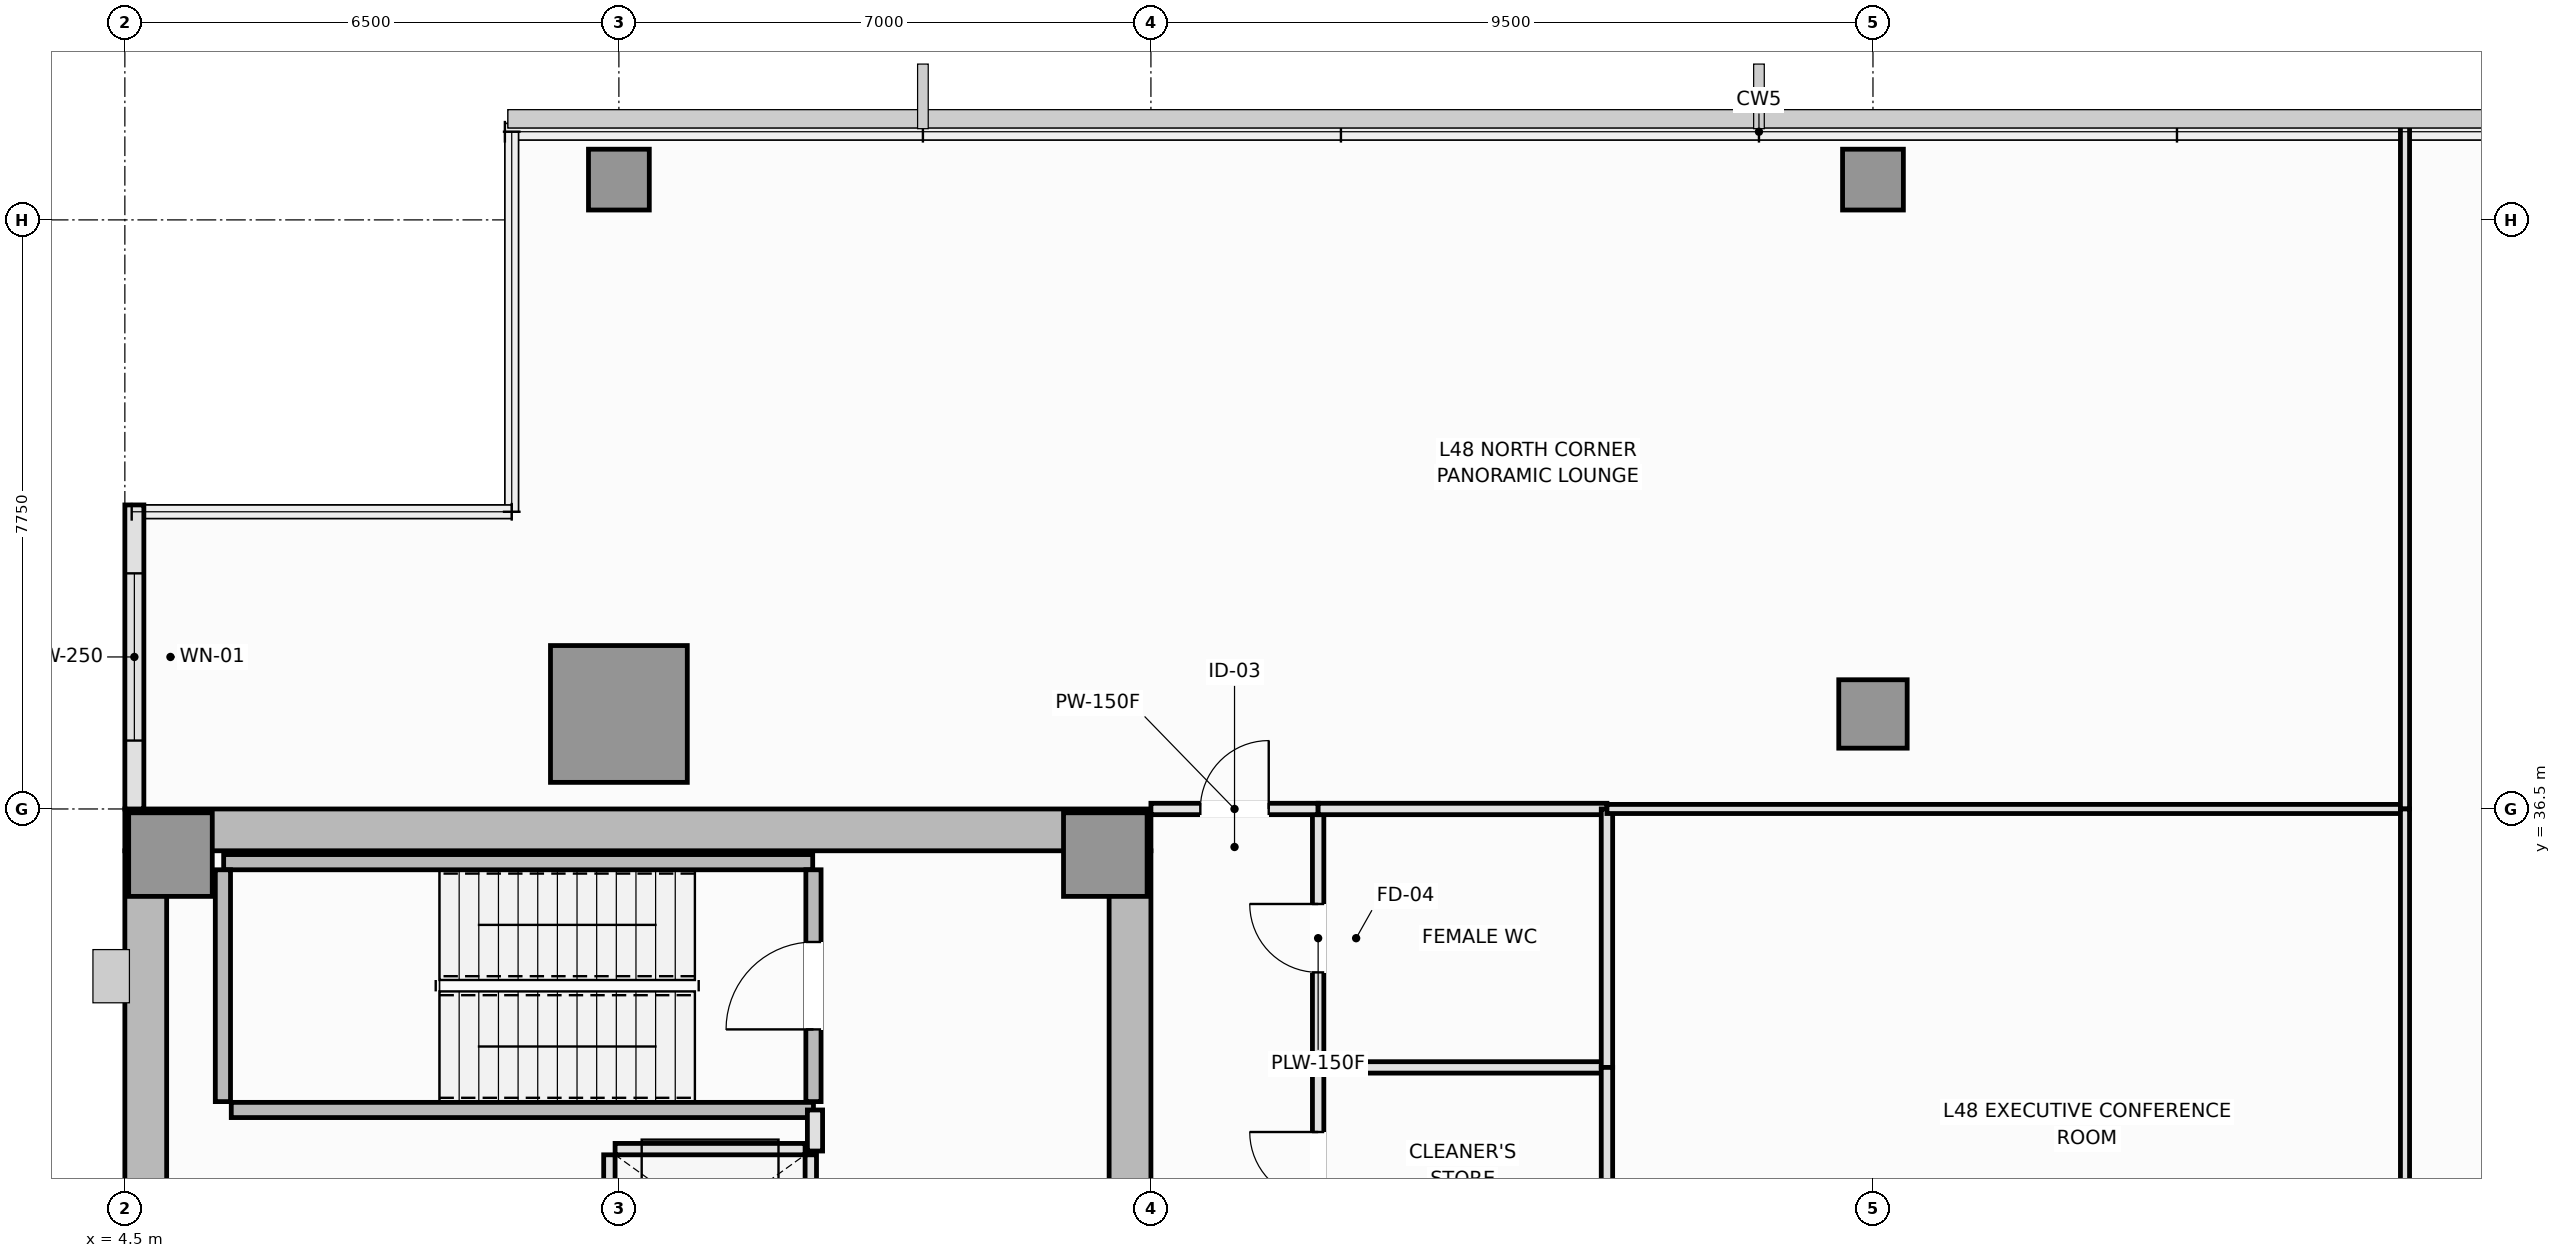
"""IFC4 building model, lengths in metres.
Left out: names, types, materials, properties, quantities, classifications, styles, units other than length and angle.
Written with IfcOpenShell. Run it as: python <this file> out.ifc"""

import sys

from ifc_helpers import new_model, si_unit, direction, frame, frame_2d, origin, origin_2d, place, context, subcontext, project, spatial, rectangle, extrude, element, fill, save


model = new_model("IFC4")
c1 = context("Model", 3, precision=1e-05, world=origin(), true_north=direction((0.0, 1.0)))
c2 = subcontext(c1, "Body", "Model", "MODEL_VIEW")
j1 = project(units=[si_unit("LENGTHUNIT", "METRE"), si_unit("PLANEANGLEUNIT", "RADIAN")], contexts=[c1])
p1 = place(None, origin())
s1 = spatial("IfcSite", under=j1, at=p1, CompositionType="ELEMENT")
p2 = place(p1, origin())
s2 = spatial("IfcBuilding", under=s1, at=p2, CompositionType="ELEMENT")
p3 = place(p2, frame((0.0, 0.0, 183.65)))
s3 = spatial("IfcBuildingStorey", under=s2, at=p3, CompositionType="ELEMENT", Elevation=183.65)
p4 = place(p3, frame((4.5, 36.225, 0.0), z_axis=(0.0, 0.0, 1.0), x_axis=(1.0, 0.0, 0.0)))
e1 = element("IfcWall", 1, at=p4, inside=s3, PredefinedType="SHEAR", context=c2, shape_type="SweptSolid", body=[
    extrude(rectangle(XDim=13.5, YDim=0.55, at=frame_2d((6.75, 0.0))), origin(), (0.0, 0.0, 1.0), 4.4),
])
p5 = place(p3, frame((4.775, 14.55, 0.0), z_axis=(0.0, 0.0, 1.0), x_axis=(0.0, 1.0, 0.0)))
e2 = element("IfcWall", 2, at=p5, inside=s3, PredefinedType="SHEAR", context=c2, shape_type="SweptSolid", body=[
    extrude(rectangle(XDim=21.4, YDim=0.55, at=frame_2d((10.7, 0.0))), origin(), (0.0, 0.0, 1.0), 4.4),
])
p6 = place(p3, frame((17.725, 27.05, 0.0), z_axis=(0.0, 0.0, 1.0), x_axis=(0.0, 1.0, 0.0)))
e3 = element("IfcWall", 3, at=p6, inside=s3, PredefinedType="SHEAR", context=c2, shape_type="SweptSolid", body=[
    extrude(rectangle(XDim=8.9, YDim=0.55, at=frame_2d((4.45, 0.0))), origin(), (0.0, 0.0, 1.0), 4.4),
])
p7 = place(p6, frame((3.45, 0.0, 0.0)))
e4 = element("IfcOpeningElement", 4, at=p7, cuts=e3, PredefinedType="OPENING", context=c2, shape_type="SweptSolid", body=[
    extrude(rectangle(XDim=1.1, YDim=2.15, at=frame_2d((0.55, 1.075))), frame((0.0, 0.285, 0.0), z_axis=(0.0, -1.0, 0.0), x_axis=(1.0, 0.0, 0.0)), (0.0, 0.0, 1.0), 0.57),
])
for number, where, z_axis, x_axis in (
    (5, (5.1, 35.9, 0.0), (0.0, 0.0, 1.0), (1.0, 0.0, 0.0)),
    (6, (17.4, 35.9, 0.0), (0.0, 0.0, 1.0), (1.0, 0.0, 0.0)),
):
    element("IfcColumn", number, at=place(p3, frame(where, z_axis=z_axis, x_axis=x_axis)), inside=s3, PredefinedType="PILASTER", context=c2, shape_type="SweptSolid", body=[
        extrude(rectangle(XDim=1.1, YDim=1.1, at=origin_2d()), origin(), (0.0, 0.0, 1.0), 4.4),
    ])
p8 = place(p3, frame((11.0, 37.75, 0.0), z_axis=(0.0, 0.0, 1.0), x_axis=(1.0, 0.0, 0.0)))
e7 = element("IfcColumn", 7, at=p8, inside=s3, PredefinedType="COLUMN", context=c2, shape_type="SweptSolid", body=[
    extrude(rectangle(XDim=1.8, YDim=1.8, at=origin_2d()), origin(), (0.0, 0.0, 1.0), 4.4),
])
p9 = place(p3, frame((27.5, 37.75, 0.0), z_axis=(0.0, 0.0, 1.0), x_axis=(1.0, 0.0, 0.0)))
e8 = element("IfcColumn", 8, at=p9, inside=s3, PredefinedType="COLUMN", context=c2, shape_type="SweptSolid", body=[
    extrude(rectangle(XDim=0.9, YDim=0.9, at=origin_2d()), origin(), (0.0, 0.0, 1.0), 4.4),
])
for number, where, z_axis, x_axis in (
    (9, (11.0, 44.78, 0.0), (0.0, 0.0, 1.0), (1.0, 0.0, 0.0)),
    (10, (27.5, 44.78, 0.0), (0.0, 0.0, 1.0), (1.0, 0.0, 0.0)),
):
    element("IfcColumn", number, at=place(p3, frame(where, z_axis=z_axis, x_axis=x_axis)), inside=s3, PredefinedType="COLUMN", context=c2, shape_type="SweptSolid", body=[
        extrude(rectangle(XDim=0.8, YDim=0.8, at=origin_2d()), origin(), (0.0, 0.0, 1.0), 4.4),
    ])
p10 = place(p3, frame((4.625, 40.5, 0.0), z_axis=(0.0, 0.0, 1.0), x_axis=(0.0, -1.0, 0.0)))
e11 = element("IfcWall", 11, at=p10, inside=s3, PredefinedType="SOLIDWALL", context=c2, shape_type="SweptSolid", body=[
    extrude(rectangle(XDim=4.0, YDim=0.25, at=frame_2d((2.0, 0.0))), origin(), (0.0, 0.0, 1.0), 4.22),
])
p11 = place(p10, frame((0.9, 0.0, 0.9)))
e12 = element("IfcOpeningElement", 12, at=p11, cuts=e11, PredefinedType="OPENING", context=c2, shape_type="SweptSolid", body=[
    extrude(rectangle(XDim=2.2, YDim=1.8, at=frame_2d((1.1, 0.9))), frame((0.0, 0.135, 0.0), z_axis=(0.0, -1.0, 0.0), x_axis=(1.0, 0.0, 0.0)), (0.0, 0.0, 1.0), 0.27),
])
p12 = place(p3, frame((5.8, 35.8, 0.0), z_axis=(0.0, 0.0, 1.0), x_axis=(1.0, 0.0, 0.0)))
e13 = element("IfcWall", 13, at=p12, inside=s3, PredefinedType="SOLIDWALL", context=c2, shape_type="SweptSolid", body=[
    extrude(rectangle(XDim=7.75, YDim=0.2, at=frame_2d((3.875, 0.0))), origin(), (0.0, 0.0, 1.0), 4.4),
])
p13 = place(p3, frame((5.79, 32.65, 0.0), z_axis=(0.0, 0.0, 1.0), x_axis=(0.0, 1.0, 0.0)))
e14 = element("IfcWall", 14, at=p13, inside=s3, PredefinedType="SOLIDWALL", context=c2, shape_type="SweptSolid", body=[
    extrude(rectangle(XDim=3.05, YDim=0.2, at=frame_2d((1.525, 0.0))), origin(), (0.0, 0.0, 1.0), 4.4),
])
p14 = place(p3, frame((5.9, 32.54, 0.0), z_axis=(0.0, 0.0, 1.0), x_axis=(1.0, 0.0, 0.0)))
e15 = element("IfcWall", 15, at=p14, inside=s3, PredefinedType="SOLIDWALL", context=c2, shape_type="SweptSolid", body=[
    extrude(rectangle(XDim=7.66, YDim=0.2, at=frame_2d((3.83, 0.0))), origin(), (0.0, 0.0, 1.0), 4.4),
])
p15 = place(p3, frame((13.56, 32.65, 0.0), z_axis=(0.0, 0.0, 1.0), x_axis=(0.0, 1.0, 0.0)))
e16 = element("IfcWall", 16, at=p15, inside=s3, PredefinedType="SOLIDWALL", context=c2, shape_type="SweptSolid", body=[
    extrude(rectangle(XDim=3.05, YDim=0.2, at=frame_2d((1.525, 0.0))), origin(), (0.0, 0.0, 1.0), 4.4),
])
p16 = place(p15, frame((0.95, 0.0, 0.0)))
e17 = element("IfcOpeningElement", 17, at=p16, cuts=e16, PredefinedType="OPENING", context=c2, shape_type="SweptSolid", body=[
    extrude(rectangle(XDim=1.15, YDim=2.15, at=frame_2d((0.575, 1.075))), frame((0.0, 0.11, 0.0), z_axis=(0.0, -1.0, 0.0), x_axis=(1.0, 0.0, 0.0)), (0.0, 0.0, 1.0), 0.22),
])
p17 = place(p3, frame((10.95, 32.025, 0.0), z_axis=(0.0, 0.0, 1.0), x_axis=(1.0, 0.0, 0.0)))
e18 = element("IfcWall", 18, at=p17, inside=s3, PredefinedType="PARTITIONING", context=c2, shape_type="SweptSolid", body=[
    extrude(rectangle(XDim=2.5, YDim=0.15, at=frame_2d((1.25, 0.0))), origin(), (0.0, 0.0, 1.0), 4.22),
])
p18 = place(p3, frame((10.875, 30.15, 0.0), z_axis=(0.0, 0.0, 1.0), x_axis=(0.0, 1.0, 0.0)))
e19 = element("IfcWall", 19, at=p18, inside=s3, PredefinedType="PARTITIONING", context=c2, shape_type="SweptSolid", body=[
    extrude(rectangle(XDim=1.8, YDim=0.15, at=frame_2d((0.9, 0.0))), origin(), (0.0, 0.0, 1.0), 4.22),
])
p19 = place(p3, frame((13.525, 30.15, 0.0), z_axis=(0.0, 0.0, 1.0), x_axis=(0.0, 1.0, 0.0)))
e20 = element("IfcWall", 20, at=p19, inside=s3, PredefinedType="PARTITIONING", context=c2, shape_type="SweptSolid", body=[
    extrude(rectangle(XDim=1.8, YDim=0.15, at=frame_2d((0.9, 0.0))), origin(), (0.0, 0.0, 1.0), 4.22),
])
p20 = place(p19, frame((0.35, 0.0, 0.0)))
e21 = element("IfcOpeningElement", 21, at=p20, cuts=e20, PredefinedType="OPENING", context=c2, shape_type="SweptSolid", body=[
    extrude(rectangle(XDim=1.1, YDim=2.2, at=frame_2d((0.55, 1.1))), frame((0.0, 0.085, 0.0), z_axis=(0.0, -1.0, 0.0), x_axis=(1.0, 0.0, 0.0)), (0.0, 0.0, 1.0), 0.17),
])
p21 = place(p3, frame((13.58, 32.0, 0.0), z_axis=(0.0, 0.0, 1.0), x_axis=(0.0, 1.0, 0.0)))
e22 = element("IfcWall", 22, at=p21, inside=s3, PredefinedType="PARTITIONING", context=c2, shape_type="SweptSolid", body=[
    extrude(rectangle(XDim=0.54, YDim=0.2, at=frame_2d((0.27, 0.0))), origin(), (0.0, 0.0, 1.0), 4.22),
])
p22 = place(p3, frame((20.2, 33.1, 0.0), z_axis=(0.0, 0.0, 1.0), x_axis=(0.0, 1.0, 0.0)))
e23 = element("IfcWall", 23, at=p22, inside=s3, PredefinedType="PLUMBINGWALL", context=c2, shape_type="SweptSolid", body=[
    extrude(rectangle(XDim=3.4, YDim=0.15, at=frame_2d((1.7, 0.0))), origin(), (0.0, 0.0, 1.0), 4.22),
])
p23 = place(p22, frame((1.25, 0.0, 0.0)))
e24 = element("IfcOpeningElement", 24, at=p23, cuts=e23, PredefinedType="OPENING", context=c2, shape_type="SweptSolid", body=[
    extrude(rectangle(XDim=0.9, YDim=2.1, at=frame_2d((0.45, 1.05))), frame((0.0, 0.085, 0.0), z_axis=(0.0, -1.0, 0.0), x_axis=(1.0, 0.0, 0.0)), (0.0, 0.0, 1.0), 0.17),
])
p24 = place(p3, frame((20.2, 30.5, 0.0), z_axis=(0.0, 0.0, 1.0), x_axis=(0.0, 1.0, 0.0)))
e25 = element("IfcWall", 25, at=p24, inside=s3, PredefinedType="PLUMBINGWALL", context=c2, shape_type="SweptSolid", body=[
    extrude(rectangle(XDim=2.6, YDim=0.15, at=frame_2d((1.3, 0.0))), origin(), (0.0, 0.0, 1.0), 4.22),
])
p25 = place(p24, frame((0.85, 0.0, 0.0)))
e26 = element("IfcOpeningElement", 26, at=p25, cuts=e25, PredefinedType="OPENING", context=c2, shape_type="SweptSolid", body=[
    extrude(rectangle(XDim=0.9, YDim=2.1, at=frame_2d((0.45, 1.05))), frame((0.0, 0.085, 0.0), z_axis=(0.0, -1.0, 0.0), x_axis=(1.0, 0.0, 0.0)), (0.0, 0.0, 1.0), 0.17),
])
p26 = place(p3, frame((18.0, 36.5, 0.0), z_axis=(0.0, 0.0, 1.0), x_axis=(1.0, 0.0, 0.0)))
e27 = element("IfcWall", 27, at=p26, inside=s3, PredefinedType="PARTITIONING", context=c2, shape_type="SweptSolid", body=[
    extrude(rectangle(XDim=2.2, YDim=0.15, at=frame_2d((1.1, 0.0))), origin(), (0.0, 0.0, 1.0), 4.22),
])
p27 = place(p26, frame((0.65, 0.0, 0.0)))
e28 = element("IfcOpeningElement", 28, at=p27, cuts=e27, PredefinedType="OPENING", context=c2, shape_type="SweptSolid", body=[
    extrude(rectangle(XDim=0.9, YDim=2.1, at=frame_2d((0.45, 1.05))), frame((0.0, 0.085, 0.0), z_axis=(0.0, -1.0, 0.0), x_axis=(1.0, 0.0, 0.0)), (0.0, 0.0, 1.0), 0.17),
])
for number, where, z_axis, x_axis in (
    (29, (20.2, 33.1, 0.0), (0.0, 0.0, 1.0), (1.0, 0.0, 0.0)),
    (30, (20.2, 36.5, 0.0), (0.0, 0.0, 1.0), (1.0, 0.0, 0.0)),
):
    element("IfcWall", number, at=place(p3, frame(where, z_axis=z_axis, x_axis=x_axis)), inside=s3, PredefinedType="PLUMBINGWALL", context=c2, shape_type="SweptSolid", body=[
        extrude(rectangle(XDim=3.8, YDim=0.15, at=frame_2d((1.9, 0.0))), origin(), (0.0, 0.0, 1.0), 4.22),
    ])
p28 = place(p3, frame((24.0, 33.1, 0.0), z_axis=(0.0, 0.0, 1.0), x_axis=(0.0, 1.0, 0.0)))
e31 = element("IfcWall", 31, at=p28, inside=s3, PredefinedType="PLUMBINGWALL", context=c2, shape_type="SweptSolid", body=[
    extrude(rectangle(XDim=3.4, YDim=0.15, at=frame_2d((1.7, 0.0))), origin(), (0.0, 0.0, 1.0), 4.22),
])
p29 = place(p3, frame((24.0, 30.5, 0.0), z_axis=(0.0, 0.0, 1.0), x_axis=(0.0, 1.0, 0.0)))
e32 = element("IfcWall", 32, at=p29, inside=s3, PredefinedType="PLUMBINGWALL", context=c2, shape_type="SweptSolid", body=[
    extrude(rectangle(XDim=2.6, YDim=0.15, at=frame_2d((1.3, 0.0))), origin(), (0.0, 0.0, 1.0), 4.22),
])
p30 = place(p3, frame((24.0, 36.5, 0.0), z_axis=(0.0, 0.0, 1.0), x_axis=(1.0, 0.0, 0.0)))
e33 = element("IfcWall", 33, at=p30, inside=s3, PredefinedType="PARTITIONING", context=c2, shape_type="SweptSolid", body=[
    extrude(rectangle(XDim=10.5, YDim=0.12, at=frame_2d((5.25, 0.0))), origin(), (0.0, 0.0, 1.0), 4.22),
])
p31 = place(p3, frame((34.5, 36.5, 0.0), z_axis=(0.0, 0.0, 1.0), x_axis=(0.0, 1.0, 0.0)))
e34 = element("IfcWall", 34, at=p31, inside=s3, PredefinedType="PARTITIONING", context=c2, shape_type="SweptSolid", body=[
    extrude(rectangle(XDim=8.99, YDim=0.12, at=frame_2d((4.495, 0.0))), origin(), (0.0, 0.0, 1.0), 3.86),
])
p32 = place(p3, frame((34.5, 26.7, 0.0), z_axis=(0.0, 0.0, 1.0), x_axis=(0.0, 1.0, 0.0)))
e35 = element("IfcWall", 35, at=p32, inside=s3, PredefinedType="PARTITIONING", context=c2, shape_type="SweptSolid", body=[
    extrude(rectangle(XDim=9.8, YDim=0.12, at=frame_2d((4.9, 0.0))), origin(), (0.0, 0.0, 1.0), 4.22),
])
p33 = place(p11, origin())
e36 = element("IfcWindow", 36, at=p33, inside=s3, PartitioningType="SINGLE_PANEL", PredefinedType="WINDOW", context=c2, shape_type="SweptSolid", body=[
    extrude(rectangle(XDim=2.2, YDim=1.8, at=frame_2d((1.1, 0.9))), frame((0.0, 0.03, 0.0), z_axis=(0.0, -1.0, 0.0), x_axis=(1.0, 0.0, 0.0)), (0.0, 0.0, 1.0), 0.06),
])
fill(e12, e36)
p34 = place(p16, origin())
e37 = element("IfcDoor", 37, at=p34, inside=s3, OperationType="SINGLE_SWING_LEFT", PredefinedType="DOOR", context=c2, shape_type="SweptSolid", body=[
    extrude(rectangle(XDim=1.15, YDim=2.15, at=frame_2d((0.575, 1.075))), frame((0.0, 0.025, 0.0), z_axis=(0.0, -1.0, 0.0), x_axis=(1.0, 0.0, 0.0)), (0.0, 0.0, 1.0), 0.05),
])
fill(e17, e37)
p35 = place(p23, origin())
e38 = element("IfcDoor", 38, at=p35, inside=s3, OperationType="SINGLE_SWING_RIGHT", PredefinedType="DOOR", context=c2, shape_type="SweptSolid", body=[
    extrude(rectangle(XDim=0.9, YDim=2.1, at=frame_2d((0.45, 1.05))), frame((0.0, 0.025, 0.0), z_axis=(0.0, -1.0, 0.0), x_axis=(1.0, 0.0, 0.0)), (0.0, 0.0, 1.0), 0.05),
])
fill(e24, e38)
p36 = place(p25, origin())
e39 = element("IfcDoor", 39, at=p36, inside=s3, OperationType="SINGLE_SWING_RIGHT", PredefinedType="DOOR", context=c2, shape_type="SweptSolid", body=[
    extrude(rectangle(XDim=0.9, YDim=2.1, at=frame_2d((0.45, 1.05))), frame((0.0, 0.025, 0.0), z_axis=(0.0, -1.0, 0.0), x_axis=(1.0, 0.0, 0.0)), (0.0, 0.0, 1.0), 0.05),
])
fill(e26, e39)
p37 = place(p27, origin())
e40 = element("IfcDoor", 40, at=p37, inside=s3, OperationType="SINGLE_SWING_RIGHT", PredefinedType="DOOR", context=c2, shape_type="SweptSolid", body=[
    extrude(rectangle(XDim=0.9, YDim=2.1, at=frame_2d((0.45, 1.05))), frame((0.0, 0.025, 0.0), z_axis=(0.0, -1.0, 0.0), x_axis=(1.0, 0.0, 0.0)), (0.0, 0.0, 1.0), 0.05),
])
fill(e28, e40)
save(model, sys.argv[1])
